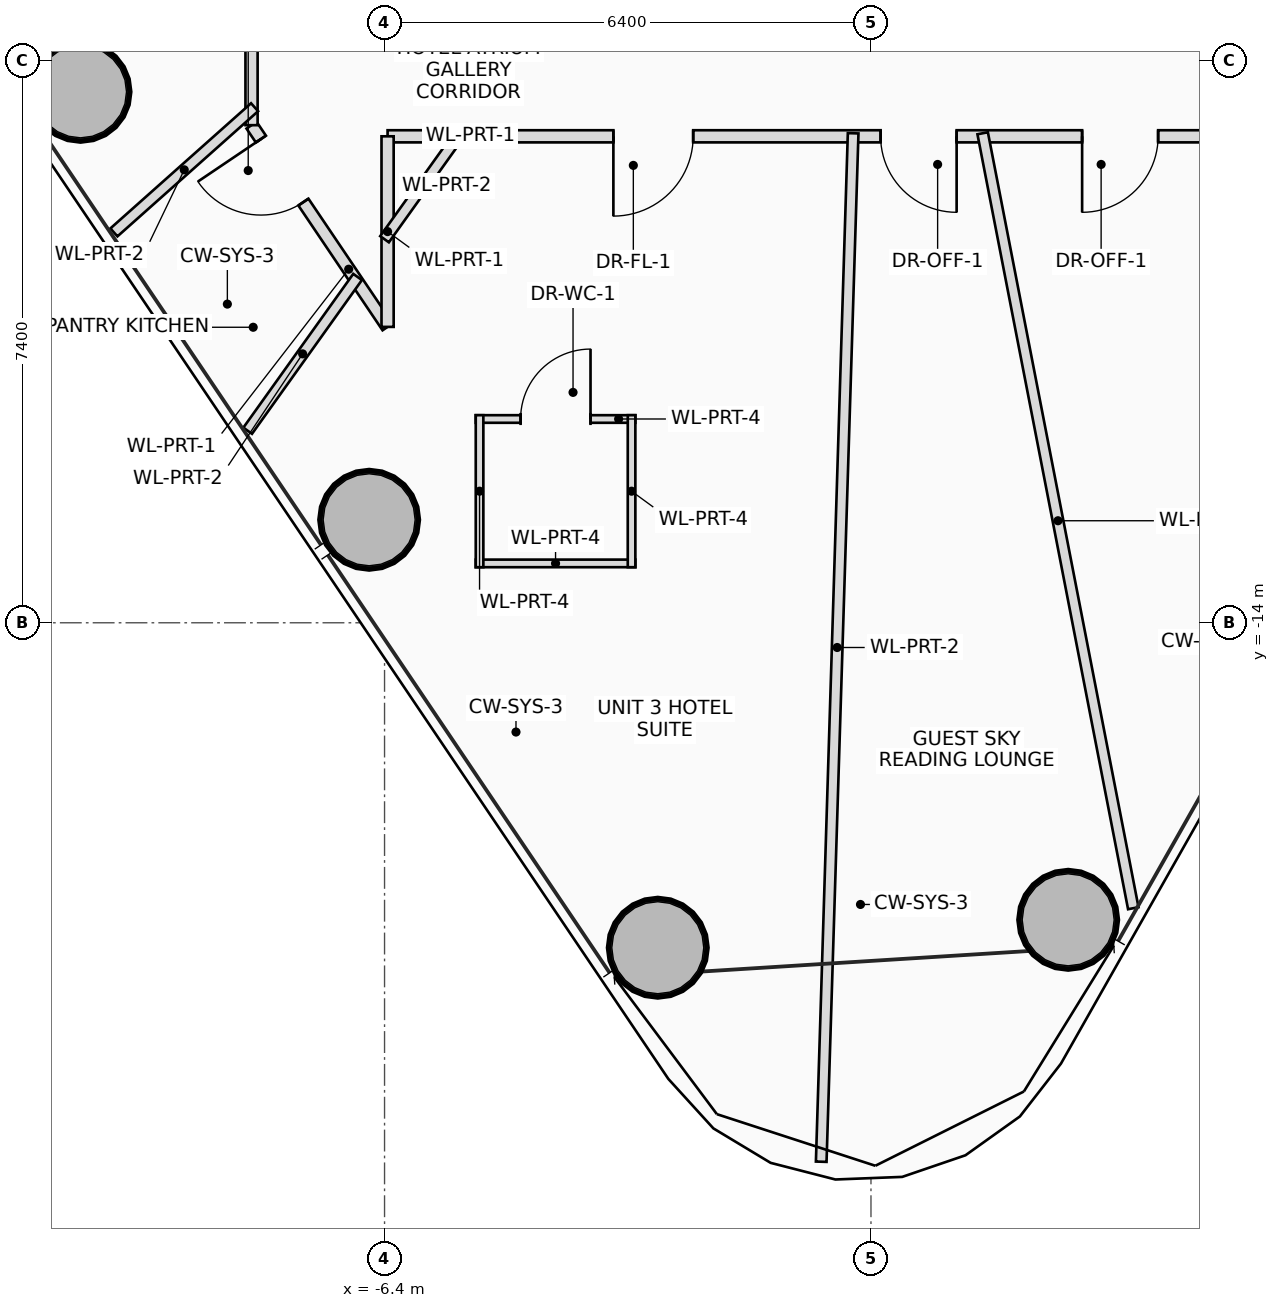
"""IFC4 building model, lengths in metres.
Left out: names, types, materials, properties, quantities, classifications, styles, units other than length and angle.
Written with IfcOpenShell. Run it as: python <this file> out.ifc"""

import sys

from ifc_helpers import new_model, si_unit, direction, frame, frame_2d, origin, origin_2d, place, context, subcontext, project, spatial, rectangle, hollow_circle, extrude, source, transform, mapped, element, fill, save


model = new_model("IFC4")
c1 = context("Model", 3, precision=1e-05, world=origin(), true_north=direction((0.0, 1.0)))
c2 = subcontext(c1, "Body", "Model", "MODEL_VIEW")
j1 = project(units=[si_unit("LENGTHUNIT", "METRE"), si_unit("PLANEANGLEUNIT", "RADIAN")], contexts=[c1])
p1 = place(None, origin())
s1 = spatial("IfcSite", under=j1, at=p1, CompositionType="ELEMENT")
p2 = place(p1, origin())
s2 = spatial("IfcBuilding", under=s1, at=p2, CompositionType="ELEMENT")
p3 = place(p2, frame((0.0, 0.0, 179.45)))
s3 = spatial("IfcBuildingStorey", under=s2, at=p3, CompositionType="ELEMENT", Elevation=179.45)
m1 = source(origin(), c2, "Body", "SweptSolid", [
    extrude(hollow_circle(Radius=0.65, WallThickness=0.045, at=origin_2d()), origin(), (0.0, 0.0, 1.0), 3.45),
])
for number, where, z_axis, x_axis in (
    (1, (2.595, -17.908, 0.0), (0.0, 0.0, 1.0), (1.0, 0.0, 0.0)),
    (2, (-10.4, -7.015, 0.0), (0.0, 0.0, 1.0), (1.0, 0.0, 0.0)),
    (3, (-6.603, -12.645, 0.0), (0.0, 0.0, 1.0), (1.0, 0.0, 0.0)),
    (4, (-2.805, -18.275, 0.0), (0.0, 0.0, 1.0), (1.0, 0.0, 0.0)),
):
    element("IfcColumn", number, at=place(p3, frame(where, z_axis=z_axis, x_axis=x_axis)), inside=s3, PredefinedType="COLUMN", context=c2, shape_type="MappedRepresentation", body=[
        mapped(m1, transform((0.0, 0.0, 0.0), scale=1.0)),
    ])
p4 = place(p3, frame((-5.2, -11.319, 0.0), z_axis=(0.0, 0.0, 1.0), x_axis=(1.0, 0.0, 0.0)))
e5 = element("IfcWall", 5, at=p4, inside=s3, PredefinedType="PARTITIONING", context=c2, shape_type="SweptSolid", body=[
    extrude(rectangle(XDim=2.1, YDim=0.1, at=frame_2d((1.05, 0.0))), origin(), (0.0, 0.0, 1.0), 2.605),
])
p5 = place(p4, frame((0.59, 0.0, 0.0)))
e6 = element("IfcOpeningElement", 6, at=p5, cuts=e5, PredefinedType="OPENING", context=c2, shape_type="SweptSolid", body=[
    extrude(rectangle(XDim=0.92, YDim=2.1, at=frame_2d((0.46, 1.05))), frame((0.0, 0.06, 0.0), z_axis=(0.0, -1.0, 0.0), x_axis=(1.0, 0.0, 0.0)), (0.0, 0.0, 1.0), 0.12),
])
p6 = place(p3, frame((-3.1, -13.219, 0.0), z_axis=(0.0, 0.0, 1.0), x_axis=(-1.0, 0.0, 0.0)))
e7 = element("IfcWall", 7, at=p6, inside=s3, PredefinedType="PARTITIONING", context=c2, shape_type="SweptSolid", body=[
    extrude(rectangle(XDim=2.1, YDim=0.1, at=frame_2d((1.05, 0.0))), origin(), (0.0, 0.0, 1.0), 2.605),
])
p7 = place(p3, frame((-3.15, -11.269, 0.0), z_axis=(0.0, 0.0, 1.0), x_axis=(0.0, -1.0, 0.0)))
e8 = element("IfcWall", 8, at=p7, inside=s3, PredefinedType="PARTITIONING", context=c2, shape_type="SweptSolid", body=[
    extrude(rectangle(XDim=2.0, YDim=0.1, at=frame_2d((1.0, 0.0))), origin(), (0.0, 0.0, 1.0), 2.805),
])
p8 = place(p3, frame((-5.15, -13.269, 0.0), z_axis=(0.0, 0.0, 1.0), x_axis=(0.0, 1.0, 0.0)))
e9 = element("IfcWall", 9, at=p8, inside=s3, PredefinedType="PARTITIONING", context=c2, shape_type="SweptSolid", body=[
    extrude(rectangle(XDim=2.0, YDim=0.1, at=frame_2d((1.0, 0.0))), origin(), (0.0, 0.0, 1.0), 3.25),
])
p9 = place(p3, frame((-6.36, -10.107, 0.0), z_axis=(0.0, 0.0, 1.0), x_axis=(-0.559145325895, 0.829069662049, 0.0)))
e10 = element("IfcWall", 10, at=p9, inside=s3, PredefinedType="PARTITIONING", context=c2, shape_type="SweptSolid", body=[
    extrude(rectangle(XDim=3.201, YDim=0.16, at=frame_2d((1.601, 0.0))), origin(), (0.0, 0.0, 1.0), 2.605),
])
p10 = place(p9, frame((1.981, 0.0, 0.0)))
e11 = element("IfcOpeningElement", 11, at=p10, cuts=e10, PredefinedType="OPENING", context=c2, shape_type="SweptSolid", body=[
    extrude(rectangle(XDim=1.0, YDim=2.25, at=frame_2d((0.5, 1.125))), frame((0.0, 0.09, 0.0), z_axis=(0.0, -1.0, 0.0), x_axis=(1.0, 0.0, 0.0)), (0.0, 0.0, 1.0), 0.18),
])
p11 = place(p3, frame((-8.15, -7.454, 0.0), z_axis=(0.0, 0.0, 1.0), x_axis=(0.0, 1.0, 0.0)))
e12 = element("IfcWall", 12, at=p11, inside=s3, PredefinedType="PARTITIONING", context=c2, shape_type="SweptSolid", body=[
    extrude(rectangle(XDim=15.054, YDim=0.16, at=frame_2d((7.527, 0.0))), origin(), (0.0, 0.0, 1.0), 2.605),
])
p12 = place(p11, frame((3.019, 0.0, 0.0)))
e13 = element("IfcOpeningElement", 13, at=p12, cuts=e12, PredefinedType="OPENING", context=c2, shape_type="SweptSolid", body=[
    extrude(rectangle(XDim=0.9, YDim=2.05, at=frame_2d((0.45, 1.025))), frame((0.0, 0.09, 0.0), z_axis=(0.0, -1.0, 0.0), x_axis=(1.0, 0.0, 0.0)), (0.0, 0.0, 1.0), 0.18),
])
p13 = place(p11, frame((7.172, 0.0, 0.0)))
e14 = element("IfcOpeningElement", 14, at=p13, cuts=e12, PredefinedType="OPENING", context=c2, shape_type="SweptSolid", body=[
    extrude(rectangle(XDim=1.0, YDim=2.25, at=frame_2d((0.5, 1.125))), frame((0.0, 0.09, 0.0), z_axis=(0.0, -1.0, 0.0), x_axis=(1.0, 0.0, 0.0)), (0.0, 0.0, 1.0), 0.18),
])
p14 = place(p11, frame((10.563, 0.0, 0.0)))
e15 = element("IfcOpeningElement", 15, at=p14, cuts=e12, PredefinedType="OPENING", context=c2, shape_type="SweptSolid", body=[
    extrude(rectangle(XDim=1.05, YDim=2.2, at=frame_2d((0.525, 1.1))), frame((0.0, 0.09, 0.0), z_axis=(0.0, -1.0, 0.0), x_axis=(1.0, 0.0, 0.0)), (0.0, 0.0, 1.0), 0.18),
])
p15 = place(p3, frame((5.25, -7.6, 0.0), z_axis=(0.0, 0.0, 1.0), x_axis=(-1.0, 0.0, 0.0)))
e16 = element("IfcWall", 16, at=p15, inside=s3, PredefinedType="PARTITIONING", context=c2, shape_type="SweptSolid", body=[
    extrude(rectangle(XDim=11.61, YDim=0.16, at=frame_2d((5.805, 0.0))), origin(), (0.0, 0.0, 1.0), 2.605),
])
p16 = place(p15, frame((1.472, 0.0, 0.0)))
e17 = element("IfcOpeningElement", 17, at=p16, cuts=e16, PredefinedType="OPENING", context=c2, shape_type="SweptSolid", body=[
    extrude(rectangle(XDim=1.0, YDim=2.25, at=frame_2d((0.5, 1.125))), frame((0.0, 0.09, 0.0), z_axis=(0.0, -1.0, 0.0), x_axis=(1.0, 0.0, 0.0)), (0.0, 0.0, 1.0), 0.18),
])
p17 = place(p15, frame((4.123, 0.0, 0.0)))
e18 = element("IfcOpeningElement", 18, at=p17, cuts=e16, PredefinedType="OPENING", context=c2, shape_type="SweptSolid", body=[
    extrude(rectangle(XDim=1.0, YDim=2.25, at=frame_2d((0.5, 1.125))), frame((0.0, 0.09, 0.0), z_axis=(0.0, -1.0, 0.0), x_axis=(1.0, 0.0, 0.0)), (0.0, 0.0, 1.0), 0.18),
])
p18 = place(p15, frame((7.589, 0.0, 0.0)))
e19 = element("IfcOpeningElement", 19, at=p18, cuts=e16, PredefinedType="OPENING", context=c2, shape_type="SweptSolid", body=[
    extrude(rectangle(XDim=1.05, YDim=2.2, at=frame_2d((0.525, 1.1))), frame((0.0, 0.09, 0.0), z_axis=(0.0, -1.0, 0.0), x_axis=(1.0, 0.0, 0.0)), (0.0, 0.0, 1.0), 0.18),
])
p19 = place(p3, frame((-6.36, -7.6, 0.0), z_axis=(0.0, 0.0, 1.0), x_axis=(0.0, -1.0, 0.0)))
e20 = element("IfcWall", 20, at=p19, inside=s3, PredefinedType="PARTITIONING", context=c2, shape_type="SweptSolid", body=[
    extrude(rectangle(XDim=2.507, YDim=0.16, at=frame_2d((1.254, 0.0))), origin(), (0.0, 0.0, 1.0), 2.605),
])
p20 = place(p3, frame((-8.11, -7.217, 0.0), z_axis=(0.0, 0.0, 1.0), x_axis=(-0.747006826924, -0.66481636602, 0.0)))
e21 = element("IfcWall", 21, at=p20, inside=s3, PredefinedType="PARTITIONING", context=c2, shape_type="SweptSolid", body=[
    extrude(rectangle(XDim=2.477, YDim=0.14, at=frame_2d((1.239, 0.0))), origin(), (0.0, 0.0, 1.0), 2.765),
])
p21 = place(p3, frame((-5.404, -7.56, 0.0), z_axis=(0.0, 0.0, 1.0), x_axis=(-0.581467296449, -0.813569777683, 0.0)))
e22 = element("IfcWall", 22, at=p21, inside=s3, PredefinedType="PARTITIONING", context=c2, shape_type="SweptSolid", body=[
    extrude(rectangle(XDim=1.713, YDim=0.14, at=frame_2d((0.857, 0.0))), origin(), (0.0, 0.0, 1.0), 2.605),
])
p22 = place(p3, frame((-6.755, -9.45, 0.0), z_axis=(0.0, 0.0, 1.0), x_axis=(-0.581461082044, -0.813574219152, 0.0)))
e23 = element("IfcWall", 23, at=p22, inside=s3, PredefinedType="PARTITIONING", context=c2, shape_type="SweptSolid", body=[
    extrude(rectangle(XDim=2.487, YDim=0.14, at=frame_2d((1.243, 0.0))), origin(), (0.0, 0.0, 1.0), 2.765),
])
p23 = place(p3, frame((-0.235, -7.56, 0.0), z_axis=(0.0, 0.0, 1.0), x_axis=(-0.031020231712, -0.999518756815, 0.0)))
e24 = element("IfcWall", 24, at=p23, inside=s3, PredefinedType="PARTITIONING", context=c2, shape_type="SweptSolid", body=[
    extrude(rectangle(XDim=13.537, YDim=0.14, at=frame_2d((6.769, 0.0))), origin(), (0.0, 0.0, 1.0), 2.765),
])
p24 = place(p3, frame((1.469, -7.56, 0.0), z_axis=(0.0, 0.0, 1.0), x_axis=(0.190824358974, -0.981624196942, 0.0)))
e25 = element("IfcWall", 25, at=p24, inside=s3, PredefinedType="PARTITIONING", context=c2, shape_type="SweptSolid", body=[
    extrude(rectangle(XDim=10.386, YDim=0.14, at=frame_2d((5.193, 0.0))), origin(), (0.0, 0.0, 1.0), 2.605),
])
p25 = place(p5, origin())
e26 = element("IfcDoor", 26, at=p25, inside=s3, OperationType="SINGLE_SWING_RIGHT", PredefinedType="DOOR", context=c2, shape_type="SweptSolid", body=[
    extrude(rectangle(XDim=0.92, YDim=2.1, at=frame_2d((0.46, 1.05))), frame((0.0, 0.025, 0.0), z_axis=(0.0, -1.0, 0.0), x_axis=(1.0, 0.0, 0.0)), (0.0, 0.0, 1.0), 0.05),
])
fill(e6, e26)
p26 = place(p10, origin())
e27 = element("IfcDoor", 27, at=p26, inside=s3, OperationType="SINGLE_SWING_RIGHT", PredefinedType="DOOR", context=c2, shape_type="SweptSolid", body=[
    extrude(rectangle(XDim=1.0, YDim=2.25, at=frame_2d((0.5, 1.125))), frame((0.0, 0.025, 0.0), z_axis=(0.0, -1.0, 0.0), x_axis=(1.0, 0.0, 0.0)), (0.0, 0.0, 1.0), 0.05),
])
fill(e11, e27)
p27 = place(p16, origin())
e28 = element("IfcDoor", 28, at=p27, inside=s3, OperationType="SINGLE_SWING_RIGHT", PredefinedType="DOOR", context=c2, shape_type="SweptSolid", body=[
    extrude(rectangle(XDim=1.0, YDim=2.25, at=frame_2d((0.5, 1.125))), frame((0.0, 0.025, 0.0), z_axis=(0.0, -1.0, 0.0), x_axis=(1.0, 0.0, 0.0)), (0.0, 0.0, 1.0), 0.05),
])
fill(e17, e28)
p28 = place(p17, origin())
e29 = element("IfcDoor", 29, at=p28, inside=s3, OperationType="SINGLE_SWING_LEFT", PredefinedType="DOOR", context=c2, shape_type="SweptSolid", body=[
    extrude(rectangle(XDim=1.0, YDim=2.25, at=frame_2d((0.5, 1.125))), frame((0.0, 0.025, 0.0), z_axis=(0.0, -1.0, 0.0), x_axis=(1.0, 0.0, 0.0)), (0.0, 0.0, 1.0), 0.05),
])
fill(e18, e29)
p29 = place(p18, origin())
e30 = element("IfcDoor", 30, at=p29, inside=s3, OperationType="SINGLE_SWING_RIGHT", PredefinedType="DOOR", context=c2, shape_type="SweptSolid", body=[
    extrude(rectangle(XDim=1.05, YDim=2.2, at=frame_2d((0.525, 1.1))), frame((0.0, 0.025, 0.0), z_axis=(0.0, -1.0, 0.0), x_axis=(1.0, 0.0, 0.0)), (0.0, 0.0, 1.0), 0.05),
])
fill(e19, e30)
save(model, sys.argv[1])
